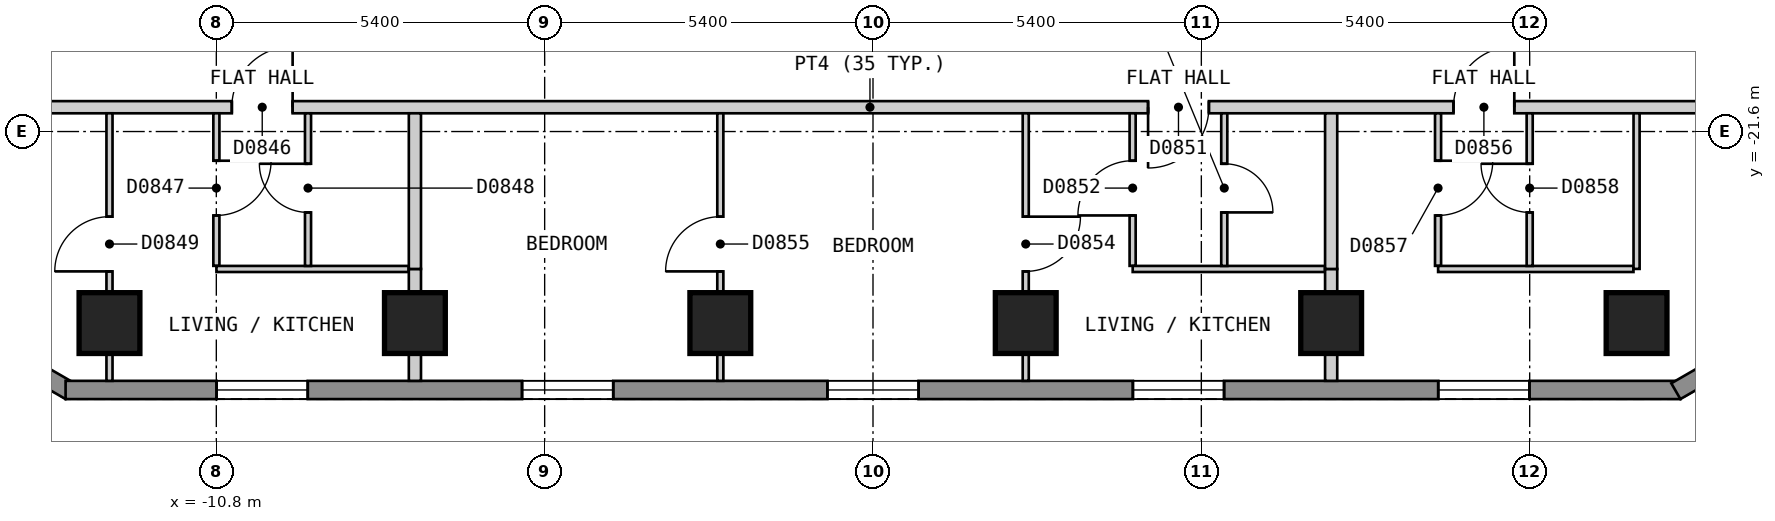
"""IFC4 building model, lengths in metres.
Left out: names, types, materials, properties, quantities, classifications, styles, units other than length and angle.
Written with IfcOpenShell. Run it as: python <this file> out.ifc"""

import sys

from ifc_helpers import new_model, si_unit, direction, frame, frame_2d, origin, origin_2d, place, context, subcontext, project, spatial, polyline, rectangle, outline, extrude, element, fill, save


model = new_model("IFC4")
c1 = context("Model", 3, precision=1e-05, world=origin(), true_north=direction((0.0, 1.0)))
c2 = subcontext(c1, "Body", "Model", "MODEL_VIEW")
j1 = project(units=[si_unit("LENGTHUNIT", "METRE"), si_unit("PLANEANGLEUNIT", "RADIAN")], contexts=[c1])
p1 = place(None, origin())
s1 = spatial("IfcSite", under=j1, at=p1, CompositionType="ELEMENT")
p2 = place(p1, origin())
s2 = spatial("IfcBuilding", under=s1, at=p2, CompositionType="ELEMENT")
p3 = place(p2, frame((0.0, 0.0, 84.0)))
s3 = spatial("IfcBuildingStorey", under=s2, at=p3, CompositionType="ELEMENT", Elevation=84.0)
for number, where, z_axis, x_axis in (
    (1, (-12.557, -24.75, 0.0), (0.0, 0.0, 1.0), (1.0, 0.0, 0.0)),
    (2, (-7.534, -24.75, 0.0), (0.0, 0.0, 1.0), (1.0, 0.0, 0.0)),
    (3, (-2.511, -24.75, 0.0), (0.0, 0.0, 1.0), (1.0, 0.0, 0.0)),
    (4, (2.512, -24.75, 0.0), (0.0, 0.0, 1.0), (1.0, 0.0, 0.0)),
    (5, (7.535, -24.75, 0.0), (0.0, 0.0, 1.0), (1.0, 0.0, 0.0)),
    (6, (12.558, -24.75, 0.0), (0.0, 0.0, 1.0), (1.0, 0.0, 0.0)),
):
    element("IfcColumn", number, at=place(p3, frame(where, z_axis=z_axis, x_axis=x_axis)), inside=s3, PredefinedType="COLUMN", context=c2, shape_type="SweptSolid", body=[
        extrude(rectangle(XDim=1.0, YDim=1.0, at=origin_2d()), origin(), (0.0, 0.0, 1.0), 3.0),
    ])
p4 = place(p3, frame((-17.534, -23.37, 0.0), z_axis=(0.0, 0.0, 1.0), x_axis=(0.866010750942, -0.50002537861, 0.0)))
e7 = element("IfcWall", 7, at=p4, inside=s3, PredefinedType="SOLIDWALL", context=c2, shape_type="SweptSolid", body=[
    extrude(outline(polyline([(0.0, -0.15), (5.0, -0.15), (4.919, 0.15), (0.08, 0.15), (0.0, -0.15)])), origin(), (0.0, 0.0, 1.0), 2.7),
])
p5 = place(p4, frame((0.65, 0.0, 0.15)))
e8 = element("IfcOpeningElement", 8, at=p5, cuts=e7, PredefinedType="OPENING", context=c2, shape_type="SweptSolid", body=[
    extrude(rectangle(XDim=1.2, YDim=2.1, at=frame_2d((0.6, 1.05))), frame((0.0, 0.16, 0.0), z_axis=(0.0, -1.0, 0.0), x_axis=(1.0, 0.0, 0.0)), (0.0, 0.0, 1.0), 0.32),
])
p6 = place(p3, frame((-13.279, -25.85, 0.0), z_axis=(0.0, 0.0, 1.0), x_axis=(1.0, 0.0, 0.0)))
e9 = element("IfcWall", 9, at=p6, inside=s3, PredefinedType="SOLIDWALL", context=c2, shape_type="SweptSolid", body=[
    extrude(outline(polyline([(0.0, -0.15), (26.558, -0.15), (26.478, 0.15), (0.08, 0.15), (0.0, -0.15)])), origin(), (0.0, 0.0, 1.0), 2.7),
])
p7 = place(p6, frame((2.483, 0.0, 0.15)))
e10 = element("IfcOpeningElement", 10, at=p7, cuts=e9, PredefinedType="OPENING", context=c2, shape_type="SweptSolid", body=[
    extrude(rectangle(XDim=1.5, YDim=2.1, at=frame_2d((0.75, 1.05))), frame((0.0, 0.16, 0.0), z_axis=(0.0, -1.0, 0.0), x_axis=(1.0, 0.0, 0.0)), (0.0, 0.0, 1.0), 0.32),
])
p8 = place(p6, frame((7.507, 0.0, 0.15)))
e11 = element("IfcOpeningElement", 11, at=p8, cuts=e9, PredefinedType="OPENING", context=c2, shape_type="SweptSolid", body=[
    extrude(rectangle(XDim=1.5, YDim=2.1, at=frame_2d((0.75, 1.05))), frame((0.0, 0.16, 0.0), z_axis=(0.0, -1.0, 0.0), x_axis=(1.0, 0.0, 0.0)), (0.0, 0.0, 1.0), 0.32),
])
p9 = place(p6, frame((12.529, 0.0, 0.15)))
e12 = element("IfcOpeningElement", 12, at=p9, cuts=e9, PredefinedType="OPENING", context=c2, shape_type="SweptSolid", body=[
    extrude(rectangle(XDim=1.5, YDim=2.1, at=frame_2d((0.75, 1.05))), frame((0.0, 0.16, 0.0), z_axis=(0.0, -1.0, 0.0), x_axis=(1.0, 0.0, 0.0)), (0.0, 0.0, 1.0), 0.32),
])
p10 = place(p6, frame((17.553, 0.0, 0.15)))
e13 = element("IfcOpeningElement", 13, at=p10, cuts=e9, PredefinedType="OPENING", context=c2, shape_type="SweptSolid", body=[
    extrude(rectangle(XDim=1.5, YDim=2.1, at=frame_2d((0.75, 1.05))), frame((0.0, 0.16, 0.0), z_axis=(0.0, -1.0, 0.0), x_axis=(1.0, 0.0, 0.0)), (0.0, 0.0, 1.0), 0.32),
])
p11 = place(p6, frame((22.575, 0.0, 0.15)))
e14 = element("IfcOpeningElement", 14, at=p11, cuts=e9, PredefinedType="OPENING", context=c2, shape_type="SweptSolid", body=[
    extrude(rectangle(XDim=1.5, YDim=2.1, at=frame_2d((0.75, 1.05))), frame((0.0, 0.16, 0.0), z_axis=(0.0, -1.0, 0.0), x_axis=(1.0, 0.0, 0.0)), (0.0, 0.0, 1.0), 0.32),
])
p12 = place(p3, frame((13.204, -25.87, 0.0), z_axis=(0.0, 0.0, 1.0), x_axis=(0.866010750942, 0.50002537861, 0.0)))
e15 = element("IfcWall", 15, at=p12, inside=s3, PredefinedType="SOLIDWALL", context=c2, shape_type="SweptSolid", body=[
    extrude(outline(polyline([(0.0, -0.15), (5.0, -0.15), (4.919, 0.15), (0.08, 0.15), (0.0, -0.15)])), origin(), (0.0, 0.0, 1.0), 2.7),
])
p13 = place(p12, frame((0.65, 0.0, 0.15)))
e16 = element("IfcOpeningElement", 16, at=p13, cuts=e15, PredefinedType="OPENING", context=c2, shape_type="SweptSolid", body=[
    extrude(rectangle(XDim=1.2, YDim=2.1, at=frame_2d((0.6, 1.05))), frame((0.0, 0.16, 0.0), z_axis=(0.0, -1.0, 0.0), x_axis=(1.0, 0.0, 0.0)), (0.0, 0.0, 1.0), 0.32),
])
p14 = place(p3, frame((-15.499, -21.2, 0.0), z_axis=(0.0, 0.0, 1.0), x_axis=(1.0, 0.0, 0.0)))
e17 = element("IfcWall", 17, at=p14, inside=s3, PredefinedType="PARTITIONING", context=c2, shape_type="SweptSolid", body=[
    extrude(rectangle(XDim=30.898, YDim=0.2, at=frame_2d((15.449, 0.0))), origin(), (0.0, 0.0, 1.0), 2.7),
])
p15 = place(p14, frame((4.954, 0.0, 0.0)))
e18 = element("IfcOpeningElement", 18, at=p15, cuts=e17, PredefinedType="OPENING", context=c2, shape_type="SweptSolid", body=[
    extrude(rectangle(XDim=1.0, YDim=2.1, at=frame_2d((0.5, 1.05))), frame((0.0, 0.11, 0.0), z_axis=(0.0, -1.0, 0.0), x_axis=(1.0, 0.0, 0.0)), (0.0, 0.0, 1.0), 0.22),
])
p16 = place(p14, frame((20.023, 0.0, 0.0)))
e19 = element("IfcOpeningElement", 19, at=p16, cuts=e17, PredefinedType="OPENING", context=c2, shape_type="SweptSolid", body=[
    extrude(rectangle(XDim=1.0, YDim=2.1, at=frame_2d((0.5, 1.05))), frame((0.0, 0.11, 0.0), z_axis=(0.0, -1.0, 0.0), x_axis=(1.0, 0.0, 0.0)), (0.0, 0.0, 1.0), 0.22),
])
p17 = place(p14, frame((25.046, 0.0, 0.0)))
e20 = element("IfcOpeningElement", 20, at=p17, cuts=e17, PredefinedType="OPENING", context=c2, shape_type="SweptSolid", body=[
    extrude(rectangle(XDim=1.0, YDim=2.1, at=frame_2d((0.5, 1.05))), frame((0.0, 0.11, 0.0), z_axis=(0.0, -1.0, 0.0), x_axis=(1.0, 0.0, 0.0)), (0.0, 0.0, 1.0), 0.22),
])
p18 = place(p3, frame((-10.799, -21.3, 0.0), z_axis=(0.0, 0.0, 1.0), x_axis=(0.0, -1.0, 0.0)))
e21 = element("IfcWall", 21, at=p18, inside=s3, PredefinedType="PARTITIONING", context=c2, shape_type="SweptSolid", body=[
    extrude(rectangle(XDim=2.509, YDim=0.1, at=frame_2d((1.254, 0.0))), origin(), (0.0, 0.0, 1.0), 2.7),
])
p19 = place(p18, frame((0.78, 0.0, 0.0)))
e22 = element("IfcOpeningElement", 22, at=p19, cuts=e21, PredefinedType="OPENING", context=c2, shape_type="SweptSolid", body=[
    extrude(rectangle(XDim=0.9, YDim=2.1, at=frame_2d((0.45, 1.05))), frame((0.0, 0.06, 0.0), z_axis=(0.0, -1.0, 0.0), x_axis=(1.0, 0.0, 0.0)), (0.0, 0.0, 1.0), 0.12),
])
p20 = place(p3, frame((4.27, -21.3, 0.0), z_axis=(0.0, 0.0, 1.0), x_axis=(0.0, -1.0, 0.0)))
e23 = element("IfcWall", 23, at=p20, inside=s3, PredefinedType="PARTITIONING", context=c2, shape_type="SweptSolid", body=[
    extrude(rectangle(XDim=2.509, YDim=0.1, at=frame_2d((1.254, 0.0))), origin(), (0.0, 0.0, 1.0), 2.7),
])
p21 = place(p20, frame((0.78, 0.0, 0.0)))
e24 = element("IfcOpeningElement", 24, at=p21, cuts=e23, PredefinedType="OPENING", context=c2, shape_type="SweptSolid", body=[
    extrude(rectangle(XDim=0.9, YDim=2.1, at=frame_2d((0.45, 1.05))), frame((0.0, 0.06, 0.0), z_axis=(0.0, -1.0, 0.0), x_axis=(1.0, 0.0, 0.0)), (0.0, 0.0, 1.0), 0.12),
])
p22 = place(p3, frame((9.293, -21.3, 0.0), z_axis=(0.0, 0.0, 1.0), x_axis=(0.0, -1.0, 0.0)))
e25 = element("IfcWall", 25, at=p22, inside=s3, PredefinedType="PARTITIONING", context=c2, shape_type="SweptSolid", body=[
    extrude(rectangle(XDim=2.509, YDim=0.1, at=frame_2d((1.254, 0.0))), origin(), (0.0, 0.0, 1.0), 2.7),
])
p23 = place(p22, frame((0.78, 0.0, 0.0)))
e26 = element("IfcOpeningElement", 26, at=p23, cuts=e25, PredefinedType="OPENING", context=c2, shape_type="SweptSolid", body=[
    extrude(rectangle(XDim=0.9, YDim=2.1, at=frame_2d((0.45, 1.05))), frame((0.0, 0.06, 0.0), z_axis=(0.0, -1.0, 0.0), x_axis=(1.0, 0.0, 0.0)), (0.0, 0.0, 1.0), 0.12),
])
for number, where, z_axis, x_axis in (
    (27, (-10.798, -23.86, 0.0), (0.0, 0.0, 1.0), (1.0, 0.0, 0.0)),
    (28, (4.271, -23.86, 0.0), (0.0, 0.0, 1.0), (1.0, 0.0, 0.0)),
):
    element("IfcWall", number, at=place(p3, frame(where, z_axis=z_axis, x_axis=x_axis)), inside=s3, PredefinedType="PARTITIONING", context=c2, shape_type="SweptSolid", body=[
        extrude(rectangle(XDim=3.164, YDim=0.1, at=frame_2d((1.582, 0.0))), origin(), (0.0, 0.0, 1.0), 2.7),
    ])
p24 = place(p3, frame((9.294, -23.86, 0.0), z_axis=(0.0, 0.0, 1.0), x_axis=(1.0, 0.0, 0.0)))
e29 = element("IfcWall", 29, at=p24, inside=s3, PredefinedType="PARTITIONING", context=c2, shape_type="SweptSolid", body=[
    extrude(rectangle(XDim=3.213, YDim=0.1, at=frame_2d((1.606, 0.0))), origin(), (0.0, 0.0, 1.0), 2.7),
])
p25 = place(p3, frame((5.777, -23.81, 0.0), z_axis=(0.0, 0.0, 1.0), x_axis=(0.0, 1.0, 0.0)))
e30 = element("IfcWall", 30, at=p25, inside=s3, PredefinedType="PARTITIONING", context=c2, shape_type="SweptSolid", body=[
    extrude(rectangle(XDim=2.51, YDim=0.1, at=frame_2d((1.255, 0.0))), origin(), (0.0, 0.0, 1.0), 2.7),
])
p26 = place(p25, frame((0.88, 0.0, 0.0)))
e31 = element("IfcOpeningElement", 31, at=p26, cuts=e30, PredefinedType="OPENING", context=c2, shape_type="SweptSolid", body=[
    extrude(rectangle(XDim=0.8, YDim=2.1, at=frame_2d((0.4, 1.05))), frame((0.0, 0.06, 0.0), z_axis=(0.0, -1.0, 0.0), x_axis=(1.0, 0.0, 0.0)), (0.0, 0.0, 1.0), 0.12),
])
p27 = place(p3, frame((10.8, -23.81, 0.0), z_axis=(0.0, 0.0, 1.0), x_axis=(0.0, 1.0, 0.0)))
e32 = element("IfcWall", 32, at=p27, inside=s3, PredefinedType="PARTITIONING", context=c2, shape_type="SweptSolid", body=[
    extrude(rectangle(XDim=2.51, YDim=0.1, at=frame_2d((1.255, 0.0))), origin(), (0.0, 0.0, 1.0), 2.7),
])
p28 = place(p27, frame((0.88, 0.0, 0.0)))
e33 = element("IfcOpeningElement", 33, at=p28, cuts=e32, PredefinedType="OPENING", context=c2, shape_type="SweptSolid", body=[
    extrude(rectangle(XDim=0.8, YDim=2.1, at=frame_2d((0.4, 1.05))), frame((0.0, 0.06, 0.0), z_axis=(0.0, -1.0, 0.0), x_axis=(1.0, 0.0, 0.0)), (0.0, 0.0, 1.0), 0.12),
])
p29 = place(p3, frame((12.558, -23.859, 0.0), z_axis=(0.0, 0.0, 1.0), x_axis=(0.0, 1.0, 0.0)))
e34 = element("IfcWall", 34, at=p29, inside=s3, PredefinedType="PARTITIONING", context=c2, shape_type="SweptSolid", body=[
    extrude(rectangle(XDim=2.559, YDim=0.1, at=frame_2d((1.279, 0.0))), origin(), (0.0, 0.0, 1.0), 2.7),
])
p30 = place(p3, frame((2.512, -25.7, 0.0), z_axis=(0.0, 0.0, 1.0), x_axis=(0.0, 1.0, 0.0)))
e35 = element("IfcWall", 35, at=p30, inside=s3, PredefinedType="PARTITIONING", context=c2, shape_type="SweptSolid", body=[
    extrude(rectangle(XDim=4.4, YDim=0.1, at=frame_2d((2.2, 0.0))), origin(), (0.0, 0.0, 1.0), 2.7),
])
p31 = place(p30, frame((1.8, 0.0, 0.0)))
e36 = element("IfcOpeningElement", 36, at=p31, cuts=e35, PredefinedType="OPENING", context=c2, shape_type="SweptSolid", body=[
    extrude(rectangle(XDim=0.9, YDim=2.1, at=frame_2d((0.45, 1.05))), frame((0.0, 0.06, 0.0), z_axis=(0.0, -1.0, 0.0), x_axis=(1.0, 0.0, 0.0)), (0.0, 0.0, 1.0), 0.12),
])
p32 = place(p3, frame((-9.292, -23.81, 0.0), z_axis=(0.0, 0.0, 1.0), x_axis=(0.0, 1.0, 0.0)))
e37 = element("IfcWall", 37, at=p32, inside=s3, PredefinedType="PARTITIONING", context=c2, shape_type="SweptSolid", body=[
    extrude(rectangle(XDim=2.51, YDim=0.1, at=frame_2d((1.255, 0.0))), origin(), (0.0, 0.0, 1.0), 2.7),
])
p33 = place(p32, frame((0.88, 0.0, 0.0)))
e38 = element("IfcOpeningElement", 38, at=p33, cuts=e37, PredefinedType="OPENING", context=c2, shape_type="SweptSolid", body=[
    extrude(rectangle(XDim=0.8, YDim=2.1, at=frame_2d((0.4, 1.05))), frame((0.0, 0.06, 0.0), z_axis=(0.0, -1.0, 0.0), x_axis=(1.0, 0.0, 0.0)), (0.0, 0.0, 1.0), 0.12),
])
p34 = place(p3, frame((-12.557, -25.7, 0.0), z_axis=(0.0, 0.0, 1.0), x_axis=(0.0, 1.0, 0.0)))
e39 = element("IfcWall", 39, at=p34, inside=s3, PredefinedType="PARTITIONING", context=c2, shape_type="SweptSolid", body=[
    extrude(rectangle(XDim=4.4, YDim=0.1, at=frame_2d((2.2, 0.0))), origin(), (0.0, 0.0, 1.0), 2.7),
])
p35 = place(p34, frame((1.8, 0.0, 0.0)))
e40 = element("IfcOpeningElement", 40, at=p35, cuts=e39, PredefinedType="OPENING", context=c2, shape_type="SweptSolid", body=[
    extrude(rectangle(XDim=0.9, YDim=2.1, at=frame_2d((0.45, 1.05))), frame((0.0, 0.06, 0.0), z_axis=(0.0, -1.0, 0.0), x_axis=(1.0, 0.0, 0.0)), (0.0, 0.0, 1.0), 0.12),
])
p36 = place(p3, frame((-2.511, -25.7, 0.0), z_axis=(0.0, 0.0, 1.0), x_axis=(0.0, 1.0, 0.0)))
e41 = element("IfcWall", 41, at=p36, inside=s3, PredefinedType="PARTITIONING", context=c2, shape_type="SweptSolid", body=[
    extrude(rectangle(XDim=4.4, YDim=0.1, at=frame_2d((2.2, 0.0))), origin(), (0.0, 0.0, 1.0), 2.7),
])
p37 = place(p36, frame((1.8, 0.0, 0.0)))
e42 = element("IfcOpeningElement", 42, at=p37, cuts=e41, PredefinedType="OPENING", context=c2, shape_type="SweptSolid", body=[
    extrude(rectangle(XDim=0.9, YDim=2.1, at=frame_2d((0.45, 1.05))), frame((0.0, 0.06, 0.0), z_axis=(0.0, -1.0, 0.0), x_axis=(1.0, 0.0, 0.0)), (0.0, 0.0, 1.0), 0.12),
])
for number, where, z_axis, x_axis in (
    (43, (-7.534, -23.86, 0.0), (0.0, 0.0, 1.0), (0.0, -1.0, 0.0)),
    (44, (7.535, -23.86, 0.0), (0.0, 0.0, 1.0), (0.0, -1.0, 0.0)),
):
    element("IfcWall", number, at=place(p3, frame(where, z_axis=z_axis, x_axis=x_axis)), inside=s3, PredefinedType="PARTITIONING", context=c2, shape_type="SweptSolid", body=[
        extrude(rectangle(XDim=1.84, YDim=0.2, at=frame_2d((0.92, 0.0))), origin(), (0.0, 0.0, 1.0), 2.7),
    ])
for number, where, z_axis, x_axis in (
    (45, (7.535, -23.86, 0.0), (0.0, 0.0, 1.0), (0.0, 1.0, 0.0)),
    (46, (-7.534, -23.86, 0.0), (0.0, 0.0, 1.0), (0.0, 1.0, 0.0)),
):
    element("IfcWall", number, at=place(p3, frame(where, z_axis=z_axis, x_axis=x_axis)), inside=s3, PredefinedType="PARTITIONING", context=c2, shape_type="SweptSolid", body=[
        extrude(rectangle(XDim=2.56, YDim=0.2, at=frame_2d((1.28, 0.0))), origin(), (0.0, 0.0, 1.0), 2.7),
    ])
p38 = place(p7, origin())
e47 = element("IfcWindow", 47, at=p38, inside=s3, PartitioningType="SINGLE_PANEL", PredefinedType="WINDOW", context=c2, shape_type="SweptSolid", body=[
    extrude(rectangle(XDim=1.5, YDim=2.1, at=frame_2d((0.75, 1.05))), frame((0.0, 0.03, 0.0), z_axis=(0.0, -1.0, 0.0), x_axis=(1.0, 0.0, 0.0)), (0.0, 0.0, 1.0), 0.06),
])
fill(e10, e47)
p39 = place(p8, origin())
e48 = element("IfcWindow", 48, at=p39, inside=s3, PartitioningType="SINGLE_PANEL", PredefinedType="WINDOW", context=c2, shape_type="SweptSolid", body=[
    extrude(rectangle(XDim=1.5, YDim=2.1, at=frame_2d((0.75, 1.05))), frame((0.0, 0.03, 0.0), z_axis=(0.0, -1.0, 0.0), x_axis=(1.0, 0.0, 0.0)), (0.0, 0.0, 1.0), 0.06),
])
fill(e11, e48)
p40 = place(p9, origin())
e49 = element("IfcWindow", 49, at=p40, inside=s3, PartitioningType="SINGLE_PANEL", PredefinedType="WINDOW", context=c2, shape_type="SweptSolid", body=[
    extrude(rectangle(XDim=1.5, YDim=2.1, at=frame_2d((0.75, 1.05))), frame((0.0, 0.03, 0.0), z_axis=(0.0, -1.0, 0.0), x_axis=(1.0, 0.0, 0.0)), (0.0, 0.0, 1.0), 0.06),
])
fill(e12, e49)
p41 = place(p10, origin())
e50 = element("IfcWindow", 50, at=p41, inside=s3, PartitioningType="SINGLE_PANEL", PredefinedType="WINDOW", context=c2, shape_type="SweptSolid", body=[
    extrude(rectangle(XDim=1.5, YDim=2.1, at=frame_2d((0.75, 1.05))), frame((0.0, 0.03, 0.0), z_axis=(0.0, -1.0, 0.0), x_axis=(1.0, 0.0, 0.0)), (0.0, 0.0, 1.0), 0.06),
])
fill(e13, e50)
p42 = place(p11, origin())
e51 = element("IfcWindow", 51, at=p42, inside=s3, PartitioningType="SINGLE_PANEL", PredefinedType="WINDOW", context=c2, shape_type="SweptSolid", body=[
    extrude(rectangle(XDim=1.5, YDim=2.1, at=frame_2d((0.75, 1.05))), frame((0.0, 0.03, 0.0), z_axis=(0.0, -1.0, 0.0), x_axis=(1.0, 0.0, 0.0)), (0.0, 0.0, 1.0), 0.06),
])
fill(e14, e51)
p43 = place(p15, origin())
e52 = element("IfcDoor", 52, at=p43, inside=s3, OperationType="SINGLE_SWING_RIGHT", PredefinedType="DOOR", context=c2, shape_type="SweptSolid", body=[
    extrude(rectangle(XDim=1.0, YDim=2.1, at=frame_2d((0.5, 1.05))), frame((0.0, 0.025, 0.0), z_axis=(0.0, -1.0, 0.0), x_axis=(1.0, 0.0, 0.0)), (0.0, 0.0, 1.0), 0.05),
])
fill(e18, e52)
p44 = place(p19, origin())
e53 = element("IfcDoor", 53, at=p44, inside=s3, OperationType="SINGLE_SWING_LEFT", PredefinedType="DOOR", context=c2, shape_type="SweptSolid", body=[
    extrude(rectangle(XDim=0.9, YDim=2.1, at=frame_2d((0.45, 1.05))), frame((0.0, 0.025, 0.0), z_axis=(0.0, -1.0, 0.0), x_axis=(1.0, 0.0, 0.0)), (0.0, 0.0, 1.0), 0.05),
])
fill(e22, e53)
p45 = place(p33, origin())
e54 = element("IfcDoor", 54, at=p45, inside=s3, OperationType="SINGLE_SWING_RIGHT", PredefinedType="DOOR", context=c2, shape_type="SweptSolid", body=[
    extrude(rectangle(XDim=0.8, YDim=2.1, at=frame_2d((0.4, 1.05))), frame((0.0, 0.025, 0.0), z_axis=(0.0, -1.0, 0.0), x_axis=(1.0, 0.0, 0.0)), (0.0, 0.0, 1.0), 0.05),
])
fill(e38, e54)
p46 = place(p35, origin())
e55 = element("IfcDoor", 55, at=p46, inside=s3, OperationType="SINGLE_SWING_LEFT", PredefinedType="DOOR", context=c2, shape_type="SweptSolid", body=[
    extrude(rectangle(XDim=0.9, YDim=2.1, at=frame_2d((0.45, 1.05))), frame((0.0, 0.025, 0.0), z_axis=(0.0, -1.0, 0.0), x_axis=(1.0, 0.0, 0.0)), (0.0, 0.0, 1.0), 0.05),
])
fill(e40, e55)
p47 = place(p16, origin())
e56 = element("IfcDoor", 56, at=p47, inside=s3, OperationType="SINGLE_SWING_LEFT", PredefinedType="DOOR", context=c2, shape_type="SweptSolid", body=[
    extrude(rectangle(XDim=1.0, YDim=2.1, at=frame_2d((0.5, 1.05))), frame((0.0, 0.025, 0.0), z_axis=(0.0, -1.0, 0.0), x_axis=(1.0, 0.0, 0.0)), (0.0, 0.0, 1.0), 0.05),
])
fill(e19, e56)
p48 = place(p21, origin())
e57 = element("IfcDoor", 57, at=p48, inside=s3, OperationType="SINGLE_SWING_RIGHT", PredefinedType="DOOR", context=c2, shape_type="SweptSolid", body=[
    extrude(rectangle(XDim=0.9, YDim=2.1, at=frame_2d((0.45, 1.05))), frame((0.0, 0.025, 0.0), z_axis=(0.0, -1.0, 0.0), x_axis=(1.0, 0.0, 0.0)), (0.0, 0.0, 1.0), 0.05),
])
fill(e24, e57)
p49 = place(p26, origin())
e58 = element("IfcDoor", 58, at=p49, inside=s3, OperationType="SINGLE_SWING_LEFT", PredefinedType="DOOR", context=c2, shape_type="SweptSolid", body=[
    extrude(rectangle(XDim=0.8, YDim=2.1, at=frame_2d((0.4, 1.05))), frame((0.0, 0.025, 0.0), z_axis=(0.0, -1.0, 0.0), x_axis=(1.0, 0.0, 0.0)), (0.0, 0.0, 1.0), 0.05),
])
fill(e31, e58)
p50 = place(p31, origin())
e59 = element("IfcDoor", 59, at=p50, inside=s3, OperationType="SINGLE_SWING_RIGHT", PredefinedType="DOOR", context=c2, shape_type="SweptSolid", body=[
    extrude(rectangle(XDim=0.9, YDim=2.1, at=frame_2d((0.45, 1.05))), frame((0.0, 0.025, 0.0), z_axis=(0.0, -1.0, 0.0), x_axis=(1.0, 0.0, 0.0)), (0.0, 0.0, 1.0), 0.05),
])
fill(e36, e59)
p51 = place(p37, origin())
e60 = element("IfcDoor", 60, at=p51, inside=s3, OperationType="SINGLE_SWING_LEFT", PredefinedType="DOOR", context=c2, shape_type="SweptSolid", body=[
    extrude(rectangle(XDim=0.9, YDim=2.1, at=frame_2d((0.45, 1.05))), frame((0.0, 0.025, 0.0), z_axis=(0.0, -1.0, 0.0), x_axis=(1.0, 0.0, 0.0)), (0.0, 0.0, 1.0), 0.05),
])
fill(e42, e60)
p52 = place(p17, origin())
e61 = element("IfcDoor", 61, at=p52, inside=s3, OperationType="SINGLE_SWING_RIGHT", PredefinedType="DOOR", context=c2, shape_type="SweptSolid", body=[
    extrude(rectangle(XDim=1.0, YDim=2.1, at=frame_2d((0.5, 1.05))), frame((0.0, 0.025, 0.0), z_axis=(0.0, -1.0, 0.0), x_axis=(1.0, 0.0, 0.0)), (0.0, 0.0, 1.0), 0.05),
])
fill(e20, e61)
p53 = place(p23, origin())
e62 = element("IfcDoor", 62, at=p53, inside=s3, OperationType="SINGLE_SWING_LEFT", PredefinedType="DOOR", context=c2, shape_type="SweptSolid", body=[
    extrude(rectangle(XDim=0.9, YDim=2.1, at=frame_2d((0.45, 1.05))), frame((0.0, 0.025, 0.0), z_axis=(0.0, -1.0, 0.0), x_axis=(1.0, 0.0, 0.0)), (0.0, 0.0, 1.0), 0.05),
])
fill(e26, e62)
p54 = place(p28, origin())
e63 = element("IfcDoor", 63, at=p54, inside=s3, OperationType="SINGLE_SWING_RIGHT", PredefinedType="DOOR", context=c2, shape_type="SweptSolid", body=[
    extrude(rectangle(XDim=0.8, YDim=2.1, at=frame_2d((0.4, 1.05))), frame((0.0, 0.025, 0.0), z_axis=(0.0, -1.0, 0.0), x_axis=(1.0, 0.0, 0.0)), (0.0, 0.0, 1.0), 0.05),
])
fill(e33, e63)
save(model, sys.argv[1])
